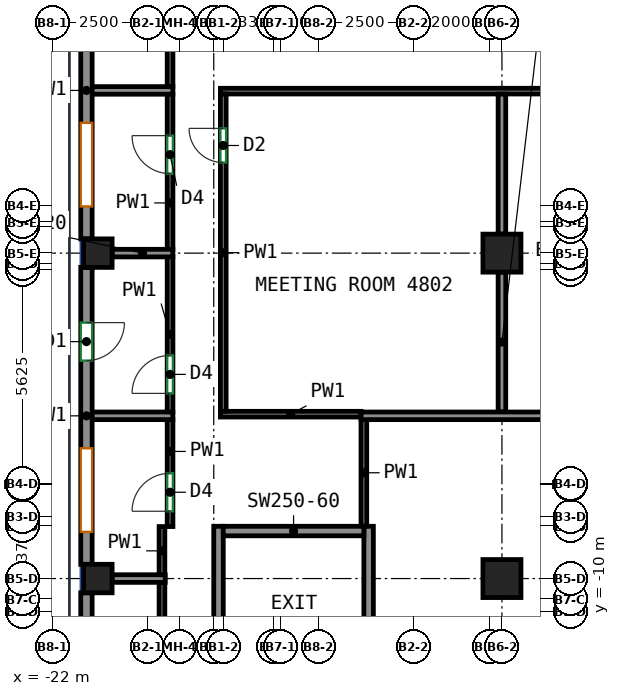
"""IFC4 building model, lengths in metres.
Left out: names, types, materials, properties, quantities, classifications, styles, units other than length and angle.
Written with IfcOpenShell. Run it as: python <this file> out.ifc"""

import sys

from ifc_helpers import new_model, si_unit, direction, frame, frame_2d, origin, origin_2d, place, context, subcontext, project, spatial, rectangle, extrude, source, transform, mapped, element, fill, save


model = new_model("IFC4")
c1 = context("Model", 3, precision=1e-05, world=origin(), true_north=direction((0.0, 1.0)))
c2 = subcontext(c1, "Body", "Model", "MODEL_VIEW")
j1 = project(units=[si_unit("LENGTHUNIT", "METRE"), si_unit("PLANEANGLEUNIT", "RADIAN")], contexts=[c1])
p1 = place(None, origin())
s1 = spatial("IfcSite", under=j1, at=p1, CompositionType="ELEMENT")
p2 = place(p1, origin())
s2 = spatial("IfcBuilding", under=s1, at=p2, CompositionType="ELEMENT")
p3 = place(p2, frame((0.0, 0.0, 199.9)))
s3 = spatial("IfcBuildingStorey", under=s2, at=p3, CompositionType="ELEMENT", Elevation=199.9)
m1 = source(origin(), c2, "Body", "SweptSolid", [
    extrude(rectangle(XDim=0.75, YDim=0.75, at=origin_2d()), origin(), (0.0, 0.0, 1.0), 3.12),
])
for number, where, z_axis, x_axis in (
    (1, (-20.8, -9.125, 0.0), (0.0, 0.0, 1.0), (1.0, 0.0, 0.0)),
    (2, (-20.8, -0.562, 0.0), (0.0, 0.0, 1.0), (1.0, 0.0, 0.0)),
):
    element("IfcColumn", number, at=place(p3, frame(where, z_axis=z_axis, x_axis=x_axis)), inside=s3, PredefinedType="COLUMN", context=c2, shape_type="MappedRepresentation", body=[
        mapped(m1, transform((0.0, 0.0, 0.0))),
    ])
m2 = source(origin(), c2, "Body", "SweptSolid", [
    extrude(rectangle(XDim=1.0, YDim=1.0, at=origin_2d()), origin(), (0.0, 0.0, 1.0), 3.12),
])
for number, where, z_axis, x_axis in (
    (3, (-10.167, -9.125, 0.0), (0.0, 0.0, 1.0), (1.0, 0.0, 0.0)),
    (4, (-10.167, -0.562, 0.0), (0.0, 0.0, 1.0), (1.0, 0.0, 0.0)),
):
    element("IfcColumn", number, at=place(p3, frame(where, z_axis=z_axis, x_axis=x_axis)), inside=s3, PredefinedType="COLUMN", context=c2, shape_type="MappedRepresentation", body=[
        mapped(m2, transform((0.0, 0.0, 0.0))),
    ])
m3 = source(origin(), c2, "Body", "SweptSolid", [
    extrude(rectangle(XDim=8.0, YDim=0.25, at=frame_2d((4.0, 0.0))), origin(), (0.0, 0.0, 1.0), 3.12),
])
for number, where, z_axis, x_axis in (
    (5, (-17.625, -15.75, 0.0), (0.0, 0.0, 1.0), (0.0, 1.0, 0.0)),
    (6, (-13.675, -15.75, 0.0), (0.0, 0.0, 1.0), (0.0, 1.0, 0.0)),
):
    element("IfcWall", number, at=place(p3, frame(where, z_axis=z_axis, x_axis=x_axis)), inside=s3, PredefinedType="SHEAR", context=c2, shape_type="MappedRepresentation", body=[
        mapped(m3, transform((0.0, 0.0, 0.0))),
    ])
m4 = source(origin(), c2, "Body", "SweptSolid", [
    extrude(rectangle(XDim=3.7, YDim=0.25, at=frame_2d((1.85, 0.0))), origin(), (0.0, 0.0, 1.0), 3.12),
])
p4 = place(p3, frame((-17.5, -7.875, 0.0), z_axis=(0.0, 0.0, 1.0), x_axis=(1.0, 0.0, 0.0)))
e7 = element("IfcWall", 7, at=p4, inside=s3, PredefinedType="SHEAR", context=c2, shape_type="MappedRepresentation", body=[
    mapped(m4, transform((0.0, 0.0, 0.0))),
])
m5 = source(origin(), c2, "Body", "SweptSolid", [
    extrude(rectangle(XDim=7.812, YDim=0.3, at=frame_2d((3.906, 0.0))), origin(), (0.0, 0.0, 1.0), 3.12),
])
p5 = place(p3, frame((-21.1, 7.625, 0.0), z_axis=(0.0, 0.0, 1.0), x_axis=(0.0, -1.0, 0.0)))
e8 = element("IfcWall", 8, at=p5, inside=s3, PredefinedType="SOLIDWALL", context=c2, shape_type="MappedRepresentation", body=[
    mapped(m5, transform((0.0, 0.0, 0.0))),
])
p6 = place(p5, frame((1.453, 0.0, 0.0)))
e9 = element("IfcOpeningElement", 9, at=p6, cuts=e8, PredefinedType="OPENING", context=c2, shape_type="SweptSolid", body=[
    extrude(rectangle(XDim=1.0, YDim=2.1, at=frame_2d((0.5, 1.05))), frame((0.0, 0.16, 0.0), z_axis=(0.0, -1.0, 0.0), x_axis=(1.0, 0.0, 0.0)), (0.0, 0.0, 1.0), 0.32),
])
p7 = place(p5, frame((4.759, 0.0, 0.85)))
e10 = element("IfcOpeningElement", 10, at=p7, cuts=e8, PredefinedType="OPENING", context=c2, shape_type="SweptSolid", body=[
    extrude(rectangle(XDim=2.2, YDim=1.95, at=frame_2d((1.1, 0.975))), frame((0.0, 0.16, 0.0), z_axis=(0.0, -1.0, 0.0), x_axis=(1.0, 0.0, 0.0)), (0.0, 0.0, 1.0), 0.32),
])
p8 = place(p3, frame((-21.1, -0.938, 0.0), z_axis=(0.0, 0.0, 1.0), x_axis=(0.0, -1.0, 0.0)))
e11 = element("IfcWall", 11, at=p8, inside=s3, PredefinedType="SOLIDWALL", context=c2, shape_type="MappedRepresentation", body=[
    mapped(m5, transform((0.0, 0.0, 0.0))),
])
p9 = place(p8, frame((1.453, 0.0, 0.0)))
e12 = element("IfcOpeningElement", 12, at=p9, cuts=e11, PredefinedType="OPENING", context=c2, shape_type="SweptSolid", body=[
    extrude(rectangle(XDim=1.0, YDim=2.1, at=frame_2d((0.5, 1.05))), frame((0.0, 0.16, 0.0), z_axis=(0.0, -1.0, 0.0), x_axis=(1.0, 0.0, 0.0)), (0.0, 0.0, 1.0), 0.32),
])
p10 = place(p8, frame((4.76, 0.0, 0.85)))
e13 = element("IfcOpeningElement", 13, at=p10, cuts=e11, PredefinedType="OPENING", context=c2, shape_type="SweptSolid", body=[
    extrude(rectangle(XDim=2.2, YDim=1.95, at=frame_2d((1.1, 0.975))), frame((0.0, 0.16, 0.0), z_axis=(0.0, -1.0, 0.0), x_axis=(1.0, 0.0, 0.0)), (0.0, 0.0, 1.0), 0.32),
])
p11 = place(p3, frame((-21.1, -9.5, 0.0), z_axis=(0.0, 0.0, 1.0), x_axis=(0.0, -1.0, 0.0)))
e14 = element("IfcWall", 14, at=p11, inside=s3, PredefinedType="SOLIDWALL", context=c2, shape_type="MappedRepresentation", body=[
    mapped(m5, transform((0.0, 0.0, 0.0))),
])
p12 = place(p11, frame((1.453, 0.0, 0.0)))
e15 = element("IfcOpeningElement", 15, at=p12, cuts=e14, PredefinedType="OPENING", context=c2, shape_type="SweptSolid", body=[
    extrude(rectangle(XDim=1.0, YDim=2.1, at=frame_2d((0.5, 1.05))), frame((0.0, 0.16, 0.0), z_axis=(0.0, -1.0, 0.0), x_axis=(1.0, 0.0, 0.0)), (0.0, 0.0, 1.0), 0.32),
])
p13 = place(p11, frame((4.759, 0.0, 0.85)))
e16 = element("IfcOpeningElement", 16, at=p13, cuts=e14, PredefinedType="OPENING", context=c2, shape_type="SweptSolid", body=[
    extrude(rectangle(XDim=2.2, YDim=1.95, at=frame_2d((1.1, 0.975))), frame((0.0, 0.16, 0.0), z_axis=(0.0, -1.0, 0.0), x_axis=(1.0, 0.0, 0.0)), (0.0, 0.0, 1.0), 0.32),
])
p14 = place(p3, frame((-19.113, -13.316, 0.0), z_axis=(0.0, 0.0, 1.0), x_axis=(0.0, 1.0, 0.0)))
e17 = element("IfcWall", 17, at=p14, inside=s3, PredefinedType="PARTITIONING", context=c2, shape_type="SweptSolid", body=[
    extrude(rectangle(XDim=4.101, YDim=0.15, at=frame_2d((2.05, 0.0))), origin(), (0.0, 0.0, 1.0), 3.12),
])
p15 = place(p14, frame((1.801, 0.0, 0.0)))
e18 = element("IfcOpeningElement", 18, at=p15, cuts=e17, PredefinedType="OPENING", context=c2, shape_type="SweptSolid", body=[
    extrude(rectangle(XDim=1.0, YDim=2.1, at=frame_2d((0.5, 1.05))), frame((0.0, 0.085, 0.0), z_axis=(0.0, -1.0, 0.0), x_axis=(1.0, 0.0, 0.0)), (0.0, 0.0, 1.0), 0.17),
])
p16 = place(p3, frame((-18.9, -7.757, 0.0), z_axis=(0.0, 0.0, 1.0), x_axis=(0.0, 1.0, 0.0)))
e19 = element("IfcWall", 19, at=p16, inside=s3, PredefinedType="PARTITIONING", context=c2, shape_type="SweptSolid", body=[
    extrude(rectangle(XDim=2.824, YDim=0.15, at=frame_2d((1.412, 0.0))), origin(), (0.0, 0.0, 1.0), 3.12),
])
p17 = place(p16, frame((0.403, 0.0, 0.0)))
e20 = element("IfcOpeningElement", 20, at=p17, cuts=e19, PredefinedType="OPENING", context=c2, shape_type="SweptSolid", body=[
    extrude(rectangle(XDim=1.0, YDim=2.1, at=frame_2d((0.5, 1.05))), frame((0.0, 0.085, 0.0), z_axis=(0.0, -1.0, 0.0), x_axis=(1.0, 0.0, 0.0)), (0.0, 0.0, 1.0), 0.17),
])
p18 = place(p3, frame((-19.113, -9.035, 0.0), z_axis=(0.0, 0.0, 1.0), x_axis=(0.0, 1.0, 0.0)))
e21 = element("IfcWall", 21, at=p18, inside=s3, PredefinedType="PARTITIONING", context=c2, shape_type="SweptSolid", body=[
    extrude(rectangle(XDim=1.278, YDim=0.15, at=frame_2d((0.639, 0.0))), origin(), (0.0, 0.0, 1.0), 3.12),
])
p19 = place(p3, frame((-18.9, -4.753, 0.0), z_axis=(0.0, 0.0, 1.0), x_axis=(0.0, 1.0, 0.0)))
e22 = element("IfcWall", 22, at=p19, inside=s3, PredefinedType="PARTITIONING", context=c2, shape_type="SweptSolid", body=[
    extrude(rectangle(XDim=4.101, YDim=0.15, at=frame_2d((2.05, 0.0))), origin(), (0.0, 0.0, 1.0), 3.12),
])
p20 = place(p19, frame((0.5, 0.0, 0.0)))
e23 = element("IfcOpeningElement", 23, at=p20, cuts=e22, PredefinedType="OPENING", context=c2, shape_type="SweptSolid", body=[
    extrude(rectangle(XDim=1.0, YDim=2.1, at=frame_2d((0.5, 1.05))), frame((0.0, 0.085, 0.0), z_axis=(0.0, -1.0, 0.0), x_axis=(1.0, 0.0, 0.0)), (0.0, 0.0, 1.0), 0.17),
])
p21 = place(p3, frame((-18.9, -0.472, 0.0), z_axis=(0.0, 0.0, 1.0), x_axis=(0.0, 1.0, 0.0)))
e24 = element("IfcWall", 24, at=p21, inside=s3, PredefinedType="PARTITIONING", context=c2, shape_type="SweptSolid", body=[
    extrude(rectangle(XDim=4.101, YDim=0.15, at=frame_2d((2.05, 0.0))), origin(), (0.0, 0.0, 1.0), 3.12),
])
p22 = place(p21, frame((2.001, 0.0, 0.0)))
e25 = element("IfcOpeningElement", 25, at=p22, cuts=e24, PredefinedType="OPENING", context=c2, shape_type="SweptSolid", body=[
    extrude(rectangle(XDim=1.0, YDim=2.1, at=frame_2d((0.5, 1.05))), frame((0.0, 0.085, 0.0), z_axis=(0.0, -1.0, 0.0), x_axis=(1.0, 0.0, 0.0)), (0.0, 0.0, 1.0), 0.17),
])
p23 = place(p3, frame((-18.9, 3.809, 0.0), z_axis=(0.0, 0.0, 1.0), x_axis=(0.0, 1.0, 0.0)))
e26 = element("IfcWall", 26, at=p23, inside=s3, PredefinedType="PARTITIONING", context=c2, shape_type="SweptSolid", body=[
    extrude(rectangle(XDim=4.092, YDim=0.15, at=frame_2d((2.046, 0.0))), origin(), (0.0, 0.0, 1.0), 3.12),
])
p24 = place(p23, frame((2.111, 0.0, 0.0)))
e27 = element("IfcOpeningElement", 27, at=p24, cuts=e26, PredefinedType="OPENING", context=c2, shape_type="SweptSolid", body=[
    extrude(rectangle(XDim=1.0, YDim=2.1, at=frame_2d((0.5, 1.05))), frame((0.0, 0.085, 0.0), z_axis=(0.0, -1.0, 0.0), x_axis=(1.0, 0.0, 0.0)), (0.0, 0.0, 1.0), 0.17),
])
p25 = place(p3, frame((-17.575, -4.8, 0.0), z_axis=(0.0, 0.0, 1.0), x_axis=(1.0, 0.0, 0.0)))
e28 = element("IfcWall", 28, at=p25, inside=s3, PredefinedType="PARTITIONING", context=c2, shape_type="SweptSolid", body=[
    extrude(rectangle(XDim=3.702, YDim=0.15, at=frame_2d((1.851, 0.0))), origin(), (0.0, 0.0, 1.0), 3.12),
])
p26 = place(p3, frame((-17.575, 3.7, 0.0), z_axis=(0.0, 0.0, 1.0), x_axis=(1.0, 0.0, 0.0)))
e29 = element("IfcWall", 29, at=p26, inside=s3, PredefinedType="PARTITIONING", context=c2, shape_type="SweptSolid", body=[
    extrude(rectangle(XDim=33.85, YDim=0.15, at=frame_2d((16.925, 0.0))), origin(), (0.0, 0.0, 1.0), 3.12),
])
p27 = place(p26, frame((10.0, 0.0, 0.0)))
e30 = element("IfcOpeningElement", 30, at=p27, cuts=e29, PredefinedType="OPENING", context=c2, shape_type="SweptSolid", body=[
    extrude(rectangle(XDim=0.9, YDim=2.1, at=frame_2d((0.45, 1.05))), frame((0.0, 0.085, 0.0), z_axis=(0.0, -1.0, 0.0), x_axis=(1.0, 0.0, 0.0)), (0.0, 0.0, 1.0), 0.17),
])
p28 = place(p26, frame((15.182, 0.0, 0.0)))
e31 = element("IfcOpeningElement", 31, at=p28, cuts=e29, PredefinedType="OPENING", context=c2, shape_type="SweptSolid", body=[
    extrude(rectangle(XDim=0.9, YDim=2.1, at=frame_2d((0.45, 1.05))), frame((0.0, 0.085, 0.0), z_axis=(0.0, -1.0, 0.0), x_axis=(1.0, 0.0, 0.0)), (0.0, 0.0, 1.0), 0.17),
])
p29 = place(p26, frame((26.367, 0.0, 0.0)))
e32 = element("IfcOpeningElement", 32, at=p29, cuts=e29, PredefinedType="OPENING", context=c2, shape_type="SweptSolid", body=[
    extrude(rectangle(XDim=0.9, YDim=2.1, at=frame_2d((0.45, 1.05))), frame((0.0, 0.085, 0.0), z_axis=(0.0, -1.0, 0.0), x_axis=(1.0, 0.0, 0.0)), (0.0, 0.0, 1.0), 0.17),
])
p30 = place(p3, frame((-17.5, -4.725, 0.0), z_axis=(0.0, 0.0, 1.0), x_axis=(0.0, 1.0, 0.0)))
e33 = element("IfcWall", 33, at=p30, inside=s3, PredefinedType="PARTITIONING", context=c2, shape_type="SweptSolid", body=[
    extrude(rectangle(XDim=8.35, YDim=0.15, at=frame_2d((4.175, 0.0))), origin(), (0.0, 0.0, 1.0), 3.12),
])
p31 = place(p30, frame((6.545, 0.0, 0.0)))
e34 = element("IfcOpeningElement", 34, at=p31, cuts=e33, PredefinedType="OPENING", context=c2, shape_type="SweptSolid", body=[
    extrude(rectangle(XDim=0.9, YDim=2.1, at=frame_2d((0.45, 1.05))), frame((0.0, 0.085, 0.0), z_axis=(0.0, -1.0, 0.0), x_axis=(1.0, 0.0, 0.0)), (0.0, 0.0, 1.0), 0.17),
])
p32 = place(p3, frame((-13.8, -7.75, 0.0), z_axis=(0.0, 0.0, 1.0), x_axis=(0.0, 1.0, 0.0)))
e35 = element("IfcWall", 35, at=p32, inside=s3, PredefinedType="PARTITIONING", context=c2, shape_type="SweptSolid", body=[
    extrude(rectangle(XDim=2.817, YDim=0.15, at=frame_2d((1.408, 0.0))), origin(), (0.0, 0.0, 1.0), 3.12),
])
p33 = place(p3, frame((-20.425, -9.125, 0.0), z_axis=(0.0, 0.0, 1.0), x_axis=(1.0, 0.0, 0.0)))
e36 = element("IfcWall", 36, at=p33, inside=s3, PredefinedType="PARTITIONING", context=c2, shape_type="SweptSolid", body=[
    extrude(rectangle(XDim=1.398, YDim=0.2, at=frame_2d((0.699, 0.0))), origin(), (0.0, 0.0, 1.0), 3.12),
])
p34 = place(p3, frame((-21.0, -4.843, 0.0), z_axis=(0.0, 0.0, 1.0), x_axis=(1.0, 0.0, 0.0)))
e37 = element("IfcWall", 37, at=p34, inside=s3, PredefinedType="PARTITIONING", context=c2, shape_type="SweptSolid", body=[
    extrude(rectangle(XDim=2.173, YDim=0.2, at=frame_2d((1.086, 0.0))), origin(), (0.0, 0.0, 1.0), 3.12),
])
p35 = place(p3, frame((-18.827, -0.562, 0.0), z_axis=(0.0, 0.0, 1.0), x_axis=(-1.0, 0.0, 0.0)))
e38 = element("IfcWall", 38, at=p35, inside=s3, PredefinedType="PARTITIONING", context=c2, shape_type="SweptSolid", body=[
    extrude(rectangle(XDim=1.598, YDim=0.2, at=frame_2d((0.799, 0.0))), origin(), (0.0, 0.0, 1.0), 2.52),
])
p36 = place(p3, frame((-21.0, 3.719, 0.0), z_axis=(0.0, 0.0, 1.0), x_axis=(1.0, 0.0, 0.0)))
e39 = element("IfcWall", 39, at=p36, inside=s3, PredefinedType="PARTITIONING", context=c2, shape_type="SweptSolid", body=[
    extrude(rectangle(XDim=2.173, YDim=0.2, at=frame_2d((1.086, 0.0))), origin(), (0.0, 0.0, 1.0), 3.12),
])
p37 = place(p3, frame((-10.167, -0.062, 0.0), z_axis=(0.0, 0.0, 1.0), x_axis=(0.0, 1.0, 0.0)))
e40 = element("IfcWall", 40, at=p37, inside=s3, PredefinedType="PARTITIONING", context=c2, shape_type="SweptSolid", body=[
    extrude(rectangle(XDim=3.685, YDim=0.2, at=frame_2d((1.843, 0.0))), origin(), (0.0, 0.0, 1.0), 3.12),
])
p38 = place(p3, frame((-10.167, -4.743, 0.0), z_axis=(0.0, 0.0, 1.0), x_axis=(0.0, 1.0, 0.0)))
e41 = element("IfcWall", 41, at=p38, inside=s3, PredefinedType="PARTITIONING", context=c2, shape_type="SweptSolid", body=[
    extrude(rectangle(XDim=3.681, YDim=0.2, at=frame_2d((1.84, 0.0))), origin(), (0.0, 0.0, 1.0), 2.52),
])
p39 = place(p3, frame((-13.873, -4.843, 0.0), z_axis=(0.0, 0.0, 1.0), x_axis=(1.0, 0.0, 0.0)))
e42 = element("IfcWall", 42, at=p39, inside=s3, PredefinedType="PARTITIONING", context=c2, shape_type="SweptSolid", body=[
    extrude(rectangle(XDim=30.146, YDim=0.2, at=frame_2d((15.073, 0.0))), origin(), (0.0, 0.0, 1.0), 3.12),
])
p40 = place(p7, origin())
e43 = element("IfcWindow", 43, at=p40, inside=s3, PartitioningType="SINGLE_PANEL", PredefinedType="WINDOW", context=c2, shape_type="SweptSolid", body=[
    extrude(rectangle(XDim=2.2, YDim=1.95, at=frame_2d((1.1, 0.975))), frame((0.0, 0.03, 0.0), z_axis=(0.0, -1.0, 0.0), x_axis=(1.0, 0.0, 0.0)), (0.0, 0.0, 1.0), 0.06),
])
fill(e10, e43)
p41 = place(p9, origin())
e44 = element("IfcDoor", 44, at=p41, inside=s3, OperationType="SINGLE_SWING_LEFT", PredefinedType="DOOR", context=c2, shape_type="SweptSolid", body=[
    extrude(rectangle(XDim=1.0, YDim=2.1, at=frame_2d((0.5, 1.05))), frame((0.0, 0.025, 0.0), z_axis=(0.0, -1.0, 0.0), x_axis=(1.0, 0.0, 0.0)), (0.0, 0.0, 1.0), 0.05),
])
fill(e12, e44)
p42 = place(p10, origin())
e45 = element("IfcWindow", 45, at=p42, inside=s3, PartitioningType="SINGLE_PANEL", PredefinedType="WINDOW", context=c2, shape_type="SweptSolid", body=[
    extrude(rectangle(XDim=2.2, YDim=1.95, at=frame_2d((1.1, 0.975))), frame((0.0, 0.03, 0.0), z_axis=(0.0, -1.0, 0.0), x_axis=(1.0, 0.0, 0.0)), (0.0, 0.0, 1.0), 0.06),
])
fill(e13, e45)
p43 = place(p17, origin())
e46 = element("IfcDoor", 46, at=p43, inside=s3, OperationType="SINGLE_SWING_LEFT", PredefinedType="DOOR", context=c2, shape_type="SweptSolid", body=[
    extrude(rectangle(XDim=1.0, YDim=2.1, at=frame_2d((0.5, 1.05))), frame((0.0, 0.025, 0.0), z_axis=(0.0, -1.0, 0.0), x_axis=(1.0, 0.0, 0.0)), (0.0, 0.0, 1.0), 0.05),
])
fill(e20, e46)
p44 = place(p20, origin())
e47 = element("IfcDoor", 47, at=p44, inside=s3, OperationType="SINGLE_SWING_LEFT", PredefinedType="DOOR", context=c2, shape_type="SweptSolid", body=[
    extrude(rectangle(XDim=1.0, YDim=2.1, at=frame_2d((0.5, 1.05))), frame((0.0, 0.025, 0.0), z_axis=(0.0, -1.0, 0.0), x_axis=(1.0, 0.0, 0.0)), (0.0, 0.0, 1.0), 0.05),
])
fill(e23, e47)
p45 = place(p22, origin())
e48 = element("IfcDoor", 48, at=p45, inside=s3, OperationType="SINGLE_SWING_RIGHT", PredefinedType="DOOR", context=c2, shape_type="SweptSolid", body=[
    extrude(rectangle(XDim=1.0, YDim=2.1, at=frame_2d((0.5, 1.05))), frame((0.0, 0.025, 0.0), z_axis=(0.0, -1.0, 0.0), x_axis=(1.0, 0.0, 0.0)), (0.0, 0.0, 1.0), 0.05),
])
fill(e25, e48)
p46 = place(p31, origin())
e49 = element("IfcDoor", 49, at=p46, inside=s3, OperationType="SINGLE_SWING_RIGHT", PredefinedType="DOOR", context=c2, shape_type="SweptSolid", body=[
    extrude(rectangle(XDim=0.9, YDim=2.1, at=frame_2d((0.45, 1.05))), frame((0.0, 0.025, 0.0), z_axis=(0.0, -1.0, 0.0), x_axis=(1.0, 0.0, 0.0)), (0.0, 0.0, 1.0), 0.05),
])
fill(e34, e49)
save(model, sys.argv[1])
